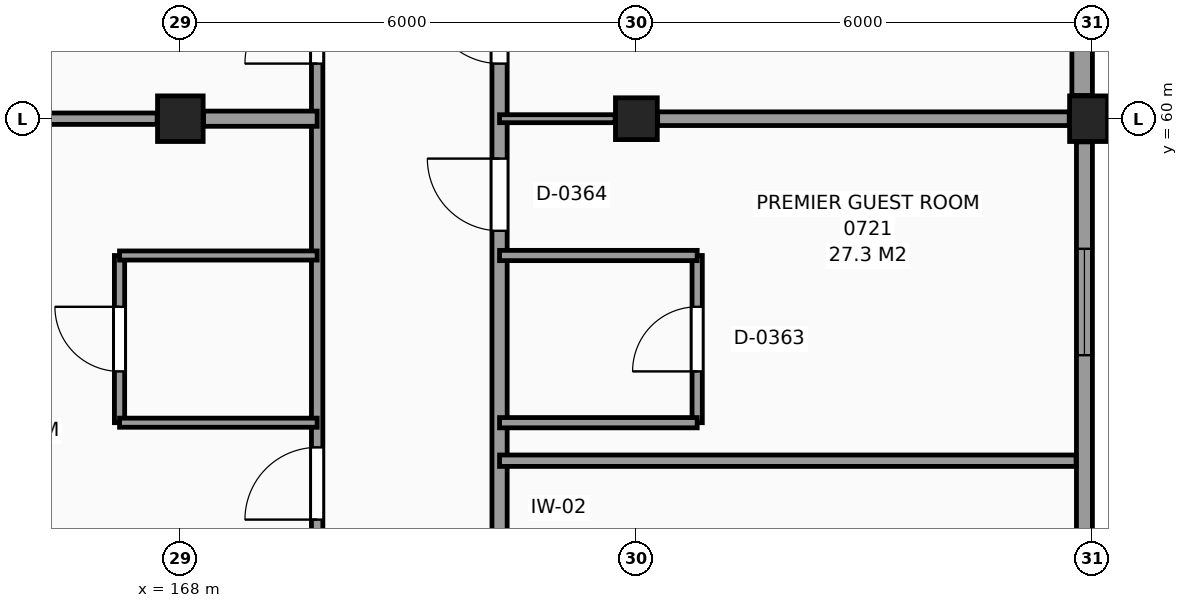
"""IFC4 building model, lengths in metres.
Left out: names, types, materials, properties, quantities, classifications, styles, units other than length and angle.
Written with IfcOpenShell. Run it as: python <this file> out.ifc"""

import sys

from ifc_helpers import new_model, si_unit, direction, frame, frame_2d, origin, origin_2d, place, context, subcontext, project, spatial, rectangle, extrude, element, fill, save


model = new_model("IFC4")
c1 = context("Model", 3, precision=1e-05, world=origin(), true_north=direction((0.0, 1.0)))
c2 = subcontext(c1, "Body", "Model", "MODEL_VIEW")
j1 = project(units=[si_unit("LENGTHUNIT", "METRE"), si_unit("PLANEANGLEUNIT", "RADIAN")], contexts=[c1])
p1 = place(None, origin())
s1 = spatial("IfcSite", under=j1, at=p1, CompositionType="ELEMENT")
p2 = place(p1, origin())
s2 = spatial("IfcBuilding", under=s1, at=p2, CompositionType="ELEMENT")
p3 = place(p2, frame((0.0, 0.0, 31.5)))
s3 = spatial("IfcBuildingStorey", under=s2, at=p3, CompositionType="ELEMENT", Elevation=31.5)
p4 = place(p3, frame((168.0, 60.0, 0.0), z_axis=(0.0, 0.0, 1.0), x_axis=(1.0, 0.0, 0.0)))
e1 = element("IfcColumn", 1, at=p4, inside=s3, PredefinedType="COLUMN", context=c2, shape_type="SweptSolid", body=[
    extrude(rectangle(XDim=0.6, YDim=0.6, at=origin_2d()), origin(), (0.0, 0.0, 1.0), 3.3),
])
p5 = place(p3, frame((174.0, 60.0, 0.0), z_axis=(0.0, 0.0, 1.0), x_axis=(1.0, 0.0, 0.0)))
e2 = element("IfcColumn", 2, at=p5, inside=s3, PredefinedType="COLUMN", context=c2, shape_type="SweptSolid", body=[
    extrude(rectangle(XDim=0.55, YDim=0.55, at=origin_2d()), origin(), (0.0, 0.0, 1.0), 3.3),
])
p6 = place(p3, frame((180.0, 60.0, 0.0), z_axis=(0.0, 0.0, 1.0), x_axis=(1.0, 0.0, 0.0)))
e3 = element("IfcColumn", 3, at=p6, inside=s3, PredefinedType="COLUMN", context=c2, shape_type="SweptSolid", body=[
    extrude(rectangle(XDim=0.6, YDim=0.6, at=origin_2d()), origin(), (0.0, 0.0, 1.0), 3.3),
])
p7 = place(p3, frame((179.895, 54.305, 0.0), z_axis=(0.0, 0.0, 1.0), x_axis=(0.0, 1.0, 0.0)))
e4 = element("IfcWall", 4, at=p7, inside=s3, PredefinedType="SOLIDWALL", context=c2, shape_type="SweptSolid", body=[
    extrude(rectangle(XDim=5.39, YDim=0.21, at=frame_2d((2.695, 0.0))), origin(), (0.0, 0.0, 1.0), 2.42),
])
p8 = place(p7, frame((2.583, 0.0, 0.8)))
e5 = element("IfcOpeningElement", 5, at=p8, cuts=e4, PredefinedType="OPENING", context=c2, shape_type="SweptSolid", body=[
    extrude(rectangle(XDim=1.4, YDim=1.4, at=frame_2d((0.7, 0.7))), frame((0.0, 0.115, 0.0), z_axis=(0.0, -1.0, 0.0), x_axis=(1.0, 0.0, 0.0)), (0.0, 0.0, 1.0), 0.23),
])
p9 = place(p3, frame((179.865, 60.305, 0.0), z_axis=(0.0, 0.0, 1.0), x_axis=(0.0, 1.0, 0.0)))
e6 = element("IfcWall", 6, at=p9, inside=s3, PredefinedType="SOLIDWALL", context=c2, shape_type="SweptSolid", body=[
    extrude(rectangle(XDim=5.39, YDim=0.27, at=frame_2d((2.695, 0.0))), origin(), (0.0, 0.0, 1.0), 2.42),
])
p10 = place(p9, frame((1.407, 0.0, 0.8)))
e7 = element("IfcOpeningElement", 7, at=p10, cuts=e6, PredefinedType="OPENING", context=c2, shape_type="SweptSolid", body=[
    extrude(rectangle(XDim=1.4, YDim=1.4, at=frame_2d((0.7, 0.7))), frame((0.0, 0.145, 0.0), z_axis=(0.0, -1.0, 0.0), x_axis=(1.0, 0.0, 0.0)), (0.0, 0.0, 1.0), 0.29),
])
p11 = place(p3, frame((167.2, 56.0, 0.0), z_axis=(0.0, 0.0, 1.0), x_axis=(0.0, 1.0, 0.0)))
e8 = element("IfcWall", 8, at=p11, inside=s3, PredefinedType="PARTITIONING", context=c2, shape_type="SweptSolid", body=[
    extrude(rectangle(XDim=2.2, YDim=0.135, at=frame_2d((1.1, 0.0))), origin(), (0.0, 0.0, 1.0), 3.07),
])
p12 = place(p11, frame((0.675, 0.0, 0.0)))
e9 = element("IfcOpeningElement", 9, at=p12, cuts=e8, PredefinedType="OPENING", context=c2, shape_type="SweptSolid", body=[
    extrude(rectangle(XDim=0.85, YDim=2.1, at=frame_2d((0.425, 1.05))), frame((0.0, 0.078, 0.0), z_axis=(0.0, -1.0, 0.0), x_axis=(1.0, 0.0, 0.0)), (0.0, 0.0, 1.0), 0.155),
])
p13 = place(p3, frame((169.8, 42.255, 0.0), z_axis=(0.0, 0.0, 1.0), x_axis=(0.0, 1.0, 0.0)))
e10 = element("IfcWall", 10, at=p13, inside=s3, PredefinedType="PARTITIONING", context=c2, shape_type="SweptSolid", body=[
    extrude(rectangle(XDim=65.565, YDim=0.15, at=frame_2d((32.783, 0.0))), origin(), (0.0, 0.0, 1.0), 3.07),
])
p14 = place(p13, frame((50.145, 0.0, 0.0)))
e11 = element("IfcOpeningElement", 11, at=p14, cuts=e10, PredefinedType="OPENING", context=c2, shape_type="SweptSolid", body=[
    extrude(rectangle(XDim=1.2, YDim=2.2, at=frame_2d((0.6, 1.1))), frame((0.0, 0.085, 0.0), z_axis=(0.0, -1.0, 0.0), x_axis=(1.0, 0.0, 0.0)), (0.0, 0.0, 1.0), 0.17),
])
p15 = place(p13, frame((0.42, 0.0, 0.0)))
e12 = element("IfcOpeningElement", 12, at=p15, cuts=e10, PredefinedType="OPENING", context=c2, shape_type="SweptSolid", body=[
    extrude(rectangle(XDim=0.95, YDim=2.1, at=frame_2d((0.475, 1.05))), frame((0.0, 0.085, 0.0), z_axis=(0.0, -1.0, 0.0), x_axis=(1.0, 0.0, 0.0)), (0.0, 0.0, 1.0), 0.17),
])
p16 = place(p13, frame((6.47, 0.0, 0.0)))
e13 = element("IfcOpeningElement", 13, at=p16, cuts=e10, PredefinedType="OPENING", context=c2, shape_type="SweptSolid", body=[
    extrude(rectangle(XDim=0.95, YDim=2.1, at=frame_2d((0.475, 1.05))), frame((0.0, 0.085, 0.0), z_axis=(0.0, -1.0, 0.0), x_axis=(1.0, 0.0, 0.0)), (0.0, 0.0, 1.0), 0.17),
])
p17 = place(p13, frame((12.47, 0.0, 0.0)))
e14 = element("IfcOpeningElement", 14, at=p17, cuts=e10, PredefinedType="OPENING", context=c2, shape_type="SweptSolid", body=[
    extrude(rectangle(XDim=0.95, YDim=2.1, at=frame_2d((0.475, 1.05))), frame((0.0, 0.085, 0.0), z_axis=(0.0, -1.0, 0.0), x_axis=(1.0, 0.0, 0.0)), (0.0, 0.0, 1.0), 0.17),
])
p18 = place(p13, frame((18.47, 0.0, 0.0)))
e15 = element("IfcOpeningElement", 15, at=p18, cuts=e10, PredefinedType="OPENING", context=c2, shape_type="SweptSolid", body=[
    extrude(rectangle(XDim=0.95, YDim=2.1, at=frame_2d((0.475, 1.05))), frame((0.0, 0.085, 0.0), z_axis=(0.0, -1.0, 0.0), x_axis=(1.0, 0.0, 0.0)), (0.0, 0.0, 1.0), 0.17),
])
p19 = place(p13, frame((24.47, 0.0, 0.0)))
e16 = element("IfcOpeningElement", 16, at=p19, cuts=e10, PredefinedType="OPENING", context=c2, shape_type="SweptSolid", body=[
    extrude(rectangle(XDim=0.95, YDim=2.1, at=frame_2d((0.475, 1.05))), frame((0.0, 0.085, 0.0), z_axis=(0.0, -1.0, 0.0), x_axis=(1.0, 0.0, 0.0)), (0.0, 0.0, 1.0), 0.17),
])
p20 = place(p13, frame((30.47, 0.0, 0.0)))
e17 = element("IfcOpeningElement", 17, at=p20, cuts=e10, PredefinedType="OPENING", context=c2, shape_type="SweptSolid", body=[
    extrude(rectangle(XDim=0.95, YDim=2.1, at=frame_2d((0.475, 1.05))), frame((0.0, 0.085, 0.0), z_axis=(0.0, -1.0, 0.0), x_axis=(1.0, 0.0, 0.0)), (0.0, 0.0, 1.0), 0.17),
])
p21 = place(p13, frame((54.47, 0.0, 0.0)))
e18 = element("IfcOpeningElement", 18, at=p21, cuts=e10, PredefinedType="OPENING", context=c2, shape_type="SweptSolid", body=[
    extrude(rectangle(XDim=0.95, YDim=2.1, at=frame_2d((0.475, 1.05))), frame((0.0, 0.085, 0.0), z_axis=(0.0, -1.0, 0.0), x_axis=(1.0, 0.0, 0.0)), (0.0, 0.0, 1.0), 0.17),
])
p22 = place(p13, frame((60.47, 0.0, 0.0)))
e19 = element("IfcOpeningElement", 19, at=p22, cuts=e10, PredefinedType="OPENING", context=c2, shape_type="SweptSolid", body=[
    extrude(rectangle(XDim=0.95, YDim=2.1, at=frame_2d((0.475, 1.05))), frame((0.0, 0.085, 0.0), z_axis=(0.0, -1.0, 0.0), x_axis=(1.0, 0.0, 0.0)), (0.0, 0.0, 1.0), 0.17),
])
p23 = place(p3, frame((172.2, 42.255, 0.0), z_axis=(0.0, 0.0, 1.0), x_axis=(0.0, 1.0, 0.0)))
e20 = element("IfcWall", 20, at=p23, inside=s3, PredefinedType="PARTITIONING", context=c2, shape_type="SweptSolid", body=[
    extrude(rectangle(XDim=65.565, YDim=0.2, at=frame_2d((32.783, 0.0))), origin(), (0.0, 0.0, 1.0), 3.07),
])
p24 = place(p23, frame((0.42, 0.0, 0.0)))
e21 = element("IfcOpeningElement", 21, at=p24, cuts=e20, PredefinedType="OPENING", context=c2, shape_type="SweptSolid", body=[
    extrude(rectangle(XDim=0.95, YDim=2.1, at=frame_2d((0.475, 1.05))), frame((0.0, 0.11, 0.0), z_axis=(0.0, -1.0, 0.0), x_axis=(1.0, 0.0, 0.0)), (0.0, 0.0, 1.0), 0.22),
])
p25 = place(p23, frame((6.47, 0.0, 0.0)))
e22 = element("IfcOpeningElement", 22, at=p25, cuts=e20, PredefinedType="OPENING", context=c2, shape_type="SweptSolid", body=[
    extrude(rectangle(XDim=0.95, YDim=2.1, at=frame_2d((0.475, 1.05))), frame((0.0, 0.11, 0.0), z_axis=(0.0, -1.0, 0.0), x_axis=(1.0, 0.0, 0.0)), (0.0, 0.0, 1.0), 0.22),
])
p26 = place(p23, frame((16.27, 0.0, 0.0)))
e23 = element("IfcOpeningElement", 23, at=p26, cuts=e20, PredefinedType="OPENING", context=c2, shape_type="SweptSolid", body=[
    extrude(rectangle(XDim=0.95, YDim=2.1, at=frame_2d((0.475, 1.05))), frame((0.0, 0.11, 0.0), z_axis=(0.0, -1.0, 0.0), x_axis=(1.0, 0.0, 0.0)), (0.0, 0.0, 1.0), 0.22),
])
p27 = place(p23, frame((18.47, 0.0, 0.0)))
e24 = element("IfcOpeningElement", 24, at=p27, cuts=e20, PredefinedType="OPENING", context=c2, shape_type="SweptSolid", body=[
    extrude(rectangle(XDim=0.95, YDim=2.1, at=frame_2d((0.475, 1.05))), frame((0.0, 0.11, 0.0), z_axis=(0.0, -1.0, 0.0), x_axis=(1.0, 0.0, 0.0)), (0.0, 0.0, 1.0), 0.22),
])
p28 = place(p23, frame((22.87, 0.0, 0.0)))
e25 = element("IfcOpeningElement", 25, at=p28, cuts=e20, PredefinedType="OPENING", context=c2, shape_type="SweptSolid", body=[
    extrude(rectangle(XDim=0.95, YDim=2.1, at=frame_2d((0.475, 1.05))), frame((0.0, 0.11, 0.0), z_axis=(0.0, -1.0, 0.0), x_axis=(1.0, 0.0, 0.0)), (0.0, 0.0, 1.0), 0.22),
])
p29 = place(p23, frame((27.37, 0.0, 0.0)))
e26 = element("IfcOpeningElement", 26, at=p29, cuts=e20, PredefinedType="OPENING", context=c2, shape_type="SweptSolid", body=[
    extrude(rectangle(XDim=0.95, YDim=2.1, at=frame_2d((0.475, 1.05))), frame((0.0, 0.11, 0.0), z_axis=(0.0, -1.0, 0.0), x_axis=(1.0, 0.0, 0.0)), (0.0, 0.0, 1.0), 0.22),
])
p30 = place(p23, frame((36.47, 0.0, 0.0)))
e27 = element("IfcOpeningElement", 27, at=p30, cuts=e20, PredefinedType="OPENING", context=c2, shape_type="SweptSolid", body=[
    extrude(rectangle(XDim=0.95, YDim=2.1, at=frame_2d((0.475, 1.05))), frame((0.0, 0.11, 0.0), z_axis=(0.0, -1.0, 0.0), x_axis=(1.0, 0.0, 0.0)), (0.0, 0.0, 1.0), 0.22),
])
p31 = place(p23, frame((40.87, 0.0, 0.0)))
e28 = element("IfcOpeningElement", 28, at=p31, cuts=e20, PredefinedType="OPENING", context=c2, shape_type="SweptSolid", body=[
    extrude(rectangle(XDim=0.95, YDim=2.1, at=frame_2d((0.475, 1.05))), frame((0.0, 0.11, 0.0), z_axis=(0.0, -1.0, 0.0), x_axis=(1.0, 0.0, 0.0)), (0.0, 0.0, 1.0), 0.22),
])
p32 = place(p23, frame((48.07, 0.0, 0.0)))
e29 = element("IfcOpeningElement", 29, at=p32, cuts=e20, PredefinedType="OPENING", context=c2, shape_type="SweptSolid", body=[
    extrude(rectangle(XDim=0.95, YDim=2.1, at=frame_2d((0.475, 1.05))), frame((0.0, 0.11, 0.0), z_axis=(0.0, -1.0, 0.0), x_axis=(1.0, 0.0, 0.0)), (0.0, 0.0, 1.0), 0.22),
])
p33 = place(p23, frame((56.32, 0.0, 0.0)))
e30 = element("IfcOpeningElement", 30, at=p33, cuts=e20, PredefinedType="OPENING", context=c2, shape_type="SweptSolid", body=[
    extrude(rectangle(XDim=0.95, YDim=2.1, at=frame_2d((0.475, 1.05))), frame((0.0, 0.11, 0.0), z_axis=(0.0, -1.0, 0.0), x_axis=(1.0, 0.0, 0.0)), (0.0, 0.0, 1.0), 0.22),
])
p34 = place(p23, frame((60.47, 0.0, 0.0)))
e31 = element("IfcOpeningElement", 31, at=p34, cuts=e20, PredefinedType="OPENING", context=c2, shape_type="SweptSolid", body=[
    extrude(rectangle(XDim=0.95, YDim=2.1, at=frame_2d((0.475, 1.05))), frame((0.0, 0.11, 0.0), z_axis=(0.0, -1.0, 0.0), x_axis=(1.0, 0.0, 0.0)), (0.0, 0.0, 1.0), 0.22),
])
p35 = place(p3, frame((174.8, 56.0, 0.0), z_axis=(0.0, 0.0, 1.0), x_axis=(0.0, 1.0, 0.0)))
e32 = element("IfcWall", 32, at=p35, inside=s3, PredefinedType="PARTITIONING", context=c2, shape_type="SweptSolid", body=[
    extrude(rectangle(XDim=2.2, YDim=0.135, at=frame_2d((1.1, 0.0))), origin(), (0.0, 0.0, 1.0), 3.07),
])
p36 = place(p35, frame((0.675, 0.0, 0.0)))
e33 = element("IfcOpeningElement", 33, at=p36, cuts=e32, PredefinedType="OPENING", context=c2, shape_type="SweptSolid", body=[
    extrude(rectangle(XDim=0.85, YDim=2.1, at=frame_2d((0.425, 1.05))), frame((0.0, 0.078, 0.0), z_axis=(0.0, -1.0, 0.0), x_axis=(1.0, 0.0, 0.0)), (0.0, 0.0, 1.0), 0.155),
])
p37 = place(p3, frame((172.2, 55.5, 0.0), z_axis=(0.0, 0.0, 1.0), x_axis=(1.0, 0.0, 0.0)))
e34 = element("IfcWall", 34, at=p37, inside=s3, PredefinedType="PARTITIONING", context=c2, shape_type="SweptSolid", body=[
    extrude(rectangle(XDim=7.585, YDim=0.15, at=frame_2d((3.792, 0.0))), origin(), (0.0, 0.0, 1.0), 3.07),
])
p38 = place(p3, frame((167.2, 56.0, 0.0), z_axis=(0.0, 0.0, 1.0), x_axis=(1.0, 0.0, 0.0)))
e35 = element("IfcWall", 35, at=p38, inside=s3, PredefinedType="PARTITIONING", context=c2, shape_type="SweptSolid", body=[
    extrude(rectangle(XDim=2.6, YDim=0.12, at=frame_2d((1.3, 0.0))), origin(), (0.0, 0.0, 1.0), 3.07),
])
p39 = place(p3, frame((172.2, 56.0, 0.0), z_axis=(0.0, 0.0, 1.0), x_axis=(1.0, 0.0, 0.0)))
e36 = element("IfcWall", 36, at=p39, inside=s3, PredefinedType="PARTITIONING", context=c2, shape_type="SweptSolid", body=[
    extrude(rectangle(XDim=2.6, YDim=0.135, at=frame_2d((1.3, 0.0))), origin(), (0.0, 0.0, 1.0), 3.07),
])
p40 = place(p3, frame((167.2, 58.2, 0.0), z_axis=(0.0, 0.0, 1.0), x_axis=(1.0, 0.0, 0.0)))
e37 = element("IfcWall", 37, at=p40, inside=s3, PredefinedType="PARTITIONING", context=c2, shape_type="SweptSolid", body=[
    extrude(rectangle(XDim=2.6, YDim=0.12, at=frame_2d((1.3, 0.0))), origin(), (0.0, 0.0, 1.0), 3.07),
])
p41 = place(p3, frame((172.2, 58.2, 0.0), z_axis=(0.0, 0.0, 1.0), x_axis=(1.0, 0.0, 0.0)))
e38 = element("IfcWall", 38, at=p41, inside=s3, PredefinedType="PARTITIONING", context=c2, shape_type="SweptSolid", body=[
    extrude(rectangle(XDim=2.6, YDim=0.135, at=frame_2d((1.3, 0.0))), origin(), (0.0, 0.0, 1.0), 3.07),
])
p42 = place(p3, frame((162.28, 60.0, 0.0), z_axis=(0.0, 0.0, 1.0), x_axis=(1.0, 0.0, 0.0)))
e39 = element("IfcWall", 39, at=p42, inside=s3, PredefinedType="PARTITIONING", context=c2, shape_type="SweptSolid", body=[
    extrude(rectangle(XDim=5.415, YDim=0.15, at=frame_2d((2.708, 0.0))), origin(), (0.0, 0.0, 1.0), 2.27),
])
p43 = place(p3, frame((168.305, 60.0, 0.0), z_axis=(0.0, 0.0, 1.0), x_axis=(1.0, 0.0, 0.0)))
e40 = element("IfcWall", 40, at=p43, inside=s3, PredefinedType="PARTITIONING", context=c2, shape_type="SweptSolid", body=[
    extrude(rectangle(XDim=1.495, YDim=0.2, at=frame_2d((0.748, 0.0))), origin(), (0.0, 0.0, 1.0), 2.27),
])
p44 = place(p3, frame((172.2, 60.0, 0.0), z_axis=(0.0, 0.0, 1.0), x_axis=(1.0, 0.0, 0.0)))
e41 = element("IfcWall", 41, at=p44, inside=s3, PredefinedType="PARTITIONING", context=c2, shape_type="SweptSolid", body=[
    extrude(rectangle(XDim=1.52, YDim=0.105, at=frame_2d((0.76, 0.0))), origin(), (0.0, 0.0, 1.0), 2.27),
])
p45 = place(p3, frame((174.28, 60.0, 0.0), z_axis=(0.0, 0.0, 1.0), x_axis=(1.0, 0.0, 0.0)))
e42 = element("IfcWall", 42, at=p45, inside=s3, PredefinedType="PARTITIONING", context=c2, shape_type="SweptSolid", body=[
    extrude(rectangle(XDim=5.415, YDim=0.18, at=frame_2d((2.708, 0.0))), origin(), (0.0, 0.0, 1.0), 2.27),
])
p46 = place(p8, origin())
e43 = element("IfcWindow", 43, at=p46, inside=s3, PartitioningType="SINGLE_PANEL", PredefinedType="WINDOW", context=c2, shape_type="SweptSolid", body=[
    extrude(rectangle(XDim=1.4, YDim=1.4, at=frame_2d((0.7, 0.7))), frame((0.0, 0.03, 0.0), z_axis=(0.0, -1.0, 0.0), x_axis=(1.0, 0.0, 0.0)), (0.0, 0.0, 1.0), 0.06),
])
fill(e5, e43)
p47 = place(p36, origin())
e44 = element("IfcDoor", 44, at=p47, inside=s3, OperationType="SINGLE_SWING_LEFT", PredefinedType="DOOR", context=c2, shape_type="SweptSolid", body=[
    extrude(rectangle(XDim=0.85, YDim=2.1, at=frame_2d((0.425, 1.05))), frame((0.0, 0.025, 0.0), z_axis=(0.0, -1.0, 0.0), x_axis=(1.0, 0.0, 0.0)), (0.0, 0.0, 1.0), 0.05),
])
fill(e33, e44)
p48 = place(p26, origin())
e45 = element("IfcDoor", 45, at=p48, inside=s3, OperationType="SINGLE_SWING_RIGHT", PredefinedType="DOOR", context=c2, shape_type="SweptSolid", body=[
    extrude(rectangle(XDim=0.95, YDim=2.1, at=frame_2d((0.475, 1.05))), frame((0.0, 0.025, 0.0), z_axis=(0.0, -1.0, 0.0), x_axis=(1.0, 0.0, 0.0)), (0.0, 0.0, 1.0), 0.05),
])
fill(e23, e45)
p49 = place(p27, origin())
e46 = element("IfcDoor", 46, at=p49, inside=s3, OperationType="SINGLE_SWING_RIGHT", PredefinedType="DOOR", context=c2, shape_type="SweptSolid", body=[
    extrude(rectangle(XDim=0.95, YDim=2.1, at=frame_2d((0.475, 1.05))), frame((0.0, 0.025, 0.0), z_axis=(0.0, -1.0, 0.0), x_axis=(1.0, 0.0, 0.0)), (0.0, 0.0, 1.0), 0.05),
])
fill(e24, e46)
p50 = place(p12, origin())
e47 = element("IfcDoor", 47, at=p50, inside=s3, OperationType="SINGLE_SWING_RIGHT", PredefinedType="DOOR", context=c2, shape_type="SweptSolid", body=[
    extrude(rectangle(XDim=0.85, YDim=2.1, at=frame_2d((0.425, 1.05))), frame((0.0, 0.025, 0.0), z_axis=(0.0, -1.0, 0.0), x_axis=(1.0, 0.0, 0.0)), (0.0, 0.0, 1.0), 0.05),
])
fill(e9, e47)
p51 = place(p17, origin())
e48 = element("IfcDoor", 48, at=p51, inside=s3, OperationType="SINGLE_SWING_LEFT", PredefinedType="DOOR", context=c2, shape_type="SweptSolid", body=[
    extrude(rectangle(XDim=0.95, YDim=2.1, at=frame_2d((0.475, 1.05))), frame((0.0, 0.025, 0.0), z_axis=(0.0, -1.0, 0.0), x_axis=(1.0, 0.0, 0.0)), (0.0, 0.0, 1.0), 0.05),
])
fill(e14, e48)
p52 = place(p18, origin())
e49 = element("IfcDoor", 49, at=p52, inside=s3, OperationType="SINGLE_SWING_LEFT", PredefinedType="DOOR", context=c2, shape_type="SweptSolid", body=[
    extrude(rectangle(XDim=0.95, YDim=2.1, at=frame_2d((0.475, 1.05))), frame((0.0, 0.025, 0.0), z_axis=(0.0, -1.0, 0.0), x_axis=(1.0, 0.0, 0.0)), (0.0, 0.0, 1.0), 0.05),
])
fill(e15, e49)
save(model, sys.argv[1])
